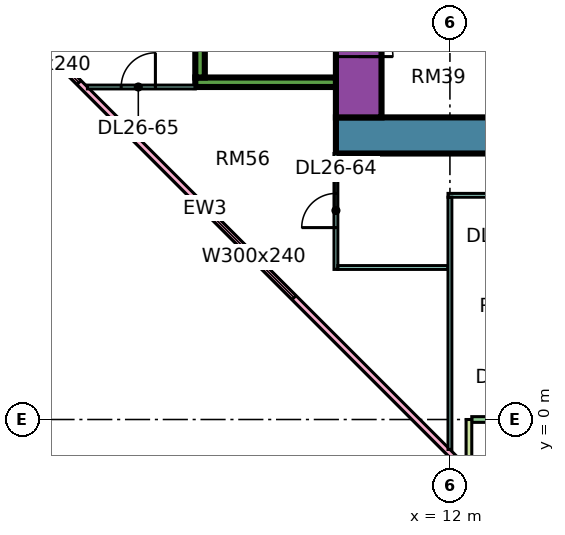
"""IFC4 building model, lengths in metres.
Left out: names, types, materials, properties, quantities, classifications, styles, units other than length and angle.
Written with IfcOpenShell. Run it as: python <this file> out.ifc"""

import sys

from ifc_helpers import new_model, si_unit, direction, frame, frame_2d, origin, place, context, subcontext, project, spatial, rectangle, extrude, element, fill, save


model = new_model("IFC4")
c1 = context("Model", 3, precision=1e-05, world=origin(), true_north=direction((0.0, 1.0)))
c2 = subcontext(c1, "Body", "Model", "MODEL_VIEW")
j1 = project(units=[si_unit("LENGTHUNIT", "METRE"), si_unit("PLANEANGLEUNIT", "RADIAN")], contexts=[c1])
p1 = place(None, origin())
s1 = spatial("IfcSite", under=j1, at=p1, CompositionType="ELEMENT")
p2 = place(p1, origin())
s2 = spatial("IfcBuilding", under=s1, at=p2, CompositionType="ELEMENT")
p3 = place(p2, frame((0.0, 0.0, 114.4)))
s3 = spatial("IfcBuildingStorey", under=s2, at=p3, CompositionType="ELEMENT", Elevation=114.4)
p4 = place(p3, frame((9.0, 7.475, 0.0), z_axis=(0.0, 0.0, 1.0), x_axis=(1.0, 0.0, 0.0)))
e1 = element("IfcWall", 1, at=p4, inside=s3, PredefinedType="SHEAR", context=c2, shape_type="SweptSolid", body=[
    extrude(rectangle(XDim=25.0, YDim=0.95, at=frame_2d((12.5, 0.0))), origin(), (0.0, 0.0, 1.0), 3.75),
])
p5 = place(p3, frame((9.6, 7.95, 0.0), z_axis=(0.0, 0.0, 1.0), x_axis=(0.0, 1.0, 0.0)))
e2 = element("IfcWall", 2, at=p5, inside=s3, PredefinedType="SHEAR", context=c2, shape_type="SweptSolid", body=[
    extrude(rectangle(XDim=11.1, YDim=1.2, at=frame_2d((5.55, 0.0))), origin(), (0.0, 0.0, 1.0), 3.75),
])
p6 = place(p5, frame((3.925, 0.0, 0.0)))
e3 = element("IfcOpeningElement", 3, at=p6, cuts=e2, PredefinedType="OPENING", context=c2, shape_type="SweptSolid", body=[
    extrude(rectangle(XDim=1.1, YDim=2.2, at=frame_2d((0.55, 1.1))), frame((0.0, 0.61, 0.0), z_axis=(0.0, -1.0, 0.0), x_axis=(1.0, 0.0, 0.0)), (0.0, 0.0, 1.0), 1.22),
])
p7 = place(p5, frame((6.425, 0.0, 0.0)))
e4 = element("IfcOpeningElement", 4, at=p7, cuts=e2, PredefinedType="OPENING", context=c2, shape_type="SweptSolid", body=[
    extrude(rectangle(XDim=1.1, YDim=2.2, at=frame_2d((0.55, 1.1))), frame((0.0, 0.61, 0.0), z_axis=(0.0, -1.0, 0.0), x_axis=(1.0, 0.0, 0.0)), (0.0, 0.0, 1.0), 1.22),
])
p8 = place(p5, frame((9.175, 0.0, 0.0)))
e5 = element("IfcOpeningElement", 5, at=p8, cuts=e2, PredefinedType="OPENING", context=c2, shape_type="SweptSolid", body=[
    extrude(rectangle(XDim=1.1, YDim=2.2, at=frame_2d((0.55, 1.1))), frame((0.0, 0.61, 0.0), z_axis=(0.0, -1.0, 0.0), x_axis=(1.0, 0.0, 0.0)), (0.0, 0.0, 1.0), 1.22),
])
p9 = place(p5, frame((1.6, 0.0, 0.0)))
e6 = element("IfcOpeningElement", 6, at=p9, cuts=e2, PredefinedType="OPENING", context=c2, shape_type="SweptSolid", body=[
    extrude(rectangle(XDim=0.9, YDim=2.1, at=frame_2d((0.45, 1.05))), frame((0.0, 0.61, 0.0), z_axis=(0.0, -1.0, 0.0), x_axis=(1.0, 0.0, 0.0)), (0.0, 0.0, 1.0), 1.22),
])
p10 = place(p3, frame((5.3, 8.875, 0.0), z_axis=(0.0, 0.0, 1.0), x_axis=(1.0, 0.0, 0.0)))
e7 = element("IfcWall", 7, at=p10, inside=s3, PredefinedType="SHEAR", context=c2, shape_type="SweptSolid", body=[
    extrude(rectangle(XDim=3.7, YDim=0.25, at=frame_2d((1.85, 0.0))), origin(), (0.0, 0.0, 1.0), 3.75),
])
p11 = place(p3, frame((5.425, 9.0, 0.0), z_axis=(0.0, 0.0, 1.0), x_axis=(0.0, 1.0, 0.0)))
e8 = element("IfcWall", 8, at=p11, inside=s3, PredefinedType="SHEAR", context=c2, shape_type="SweptSolid", body=[
    extrude(rectangle(XDim=4.0, YDim=0.25, at=frame_2d((2.0, 0.0))), origin(), (0.0, 0.0, 1.0), 3.75),
])
p12 = place(p3, frame((-1.447, 12.553, 0.0), z_axis=(0.0, 0.0, 1.0), x_axis=(0.707106781187, -0.707106781187, 0.0)))
e9 = element("IfcWall", 9, at=p12, inside=s3, PredefinedType="SOLIDWALL", context=c2, shape_type="SweptSolid", body=[
    extrude(rectangle(XDim=19.799, YDim=0.15, at=frame_2d((9.899, 0.0))), origin(), (0.0, 0.0, 1.0), 3.35),
])
p13 = place(p12, frame((2.212, 0.0, 0.45)))
e10 = element("IfcOpeningElement", 10, at=p13, cuts=e9, PredefinedType="OPENING", context=c2, shape_type="SweptSolid", body=[
    extrude(rectangle(XDim=3.0, YDim=2.4, at=frame_2d((1.5, 1.2))), frame((0.0, 0.085, 0.0), z_axis=(0.0, -1.0, 0.0), x_axis=(1.0, 0.0, 0.0)), (0.0, 0.0, 1.0), 0.17),
])
p14 = place(p12, frame((10.216, 0.0, 0.45)))
e11 = element("IfcOpeningElement", 11, at=p14, cuts=e9, PredefinedType="OPENING", context=c2, shape_type="SweptSolid", body=[
    extrude(rectangle(XDim=3.0, YDim=2.4, at=frame_2d((1.5, 1.2))), frame((0.0, 0.085, 0.0), z_axis=(0.0, -1.0, 0.0), x_axis=(1.0, 0.0, 0.0)), (0.0, 0.0, 1.0), 0.17),
])
p15 = place(p3, frame((12.575, 0.0, 0.0), z_axis=(0.0, 0.0, 1.0), x_axis=(1.0, 0.0, 0.0)))
e12 = element("IfcWall", 12, at=p15, inside=s3, PredefinedType="SOLIDWALL", context=c2, shape_type="SweptSolid", body=[
    extrude(rectangle(XDim=11.35, YDim=0.15, at=frame_2d((5.675, 0.0))), origin(), (0.0, 0.0, 1.0), 3.35),
])
p16 = place(p15, frame((0.613, 0.0, 0.0)))
e13 = element("IfcOpeningElement", 13, at=p16, cuts=e12, PredefinedType="OPENING", context=c2, shape_type="SweptSolid", body=[
    extrude(rectangle(XDim=1.2, YDim=2.4, at=frame_2d((0.6, 1.2))), frame((0.0, 0.085, 0.0), z_axis=(0.0, -1.0, 0.0), x_axis=(1.0, 0.0, 0.0)), (0.0, 0.0, 1.0), 0.17),
])
p17 = place(p15, frame((3.025, 0.0, 0.45)))
e14 = element("IfcOpeningElement", 14, at=p17, cuts=e12, PredefinedType="OPENING", context=c2, shape_type="SweptSolid", body=[
    extrude(rectangle(XDim=1.8, YDim=2.4, at=frame_2d((0.9, 1.2))), frame((0.0, 0.085, 0.0), z_axis=(0.0, -1.0, 0.0), x_axis=(1.0, 0.0, 0.0)), (0.0, 0.0, 1.0), 0.17),
])
p18 = place(p15, frame((6.025, 0.0, 0.45)))
e15 = element("IfcOpeningElement", 15, at=p18, cuts=e12, PredefinedType="OPENING", context=c2, shape_type="SweptSolid", body=[
    extrude(rectangle(XDim=1.8, YDim=2.4, at=frame_2d((0.9, 1.2))), frame((0.0, 0.085, 0.0), z_axis=(0.0, -1.0, 0.0), x_axis=(1.0, 0.0, 0.0)), (0.0, 0.0, 1.0), 0.17),
])
p19 = place(p15, frame((9.025, 0.0, 0.45)))
e16 = element("IfcOpeningElement", 16, at=p19, cuts=e12, PredefinedType="OPENING", context=c2, shape_type="SweptSolid", body=[
    extrude(rectangle(XDim=1.2, YDim=2.4, at=frame_2d((0.6, 1.2))), frame((0.0, 0.085, 0.0), z_axis=(0.0, -1.0, 0.0), x_axis=(1.0, 0.0, 0.0)), (0.0, 0.0, 1.0), 0.17),
])
p20 = place(p3, frame((12.5, -1.5, 0.0), z_axis=(0.0, 0.0, 1.0), x_axis=(0.0, 1.0, 0.0)))
e17 = element("IfcWall", 17, at=p20, inside=s3, PredefinedType="SOLIDWALL", context=c2, shape_type="SweptSolid", body=[
    extrude(rectangle(XDim=1.5, YDim=0.15, at=frame_2d((0.75, 0.0))), origin(), (0.0, 0.0, 1.0), 3.35),
])
p21 = place(p3, frame((2.461, 8.75, 0.0), z_axis=(0.0, 0.0, 1.0), x_axis=(1.0, 0.0, 0.0)))
e18 = element("IfcWall", 18, at=p21, inside=s3, PredefinedType="PARTITIONING", context=c2, shape_type="SweptSolid", body=[
    extrude(rectangle(XDim=2.839, YDim=0.1, at=frame_2d((1.419, 0.0))), origin(), (0.0, 0.0, 1.0), 3.35),
])
p22 = place(p21, frame((0.889, 0.0, 0.0)))
e19 = element("IfcOpeningElement", 19, at=p22, cuts=e18, PredefinedType="OPENING", context=c2, shape_type="SweptSolid", body=[
    extrude(rectangle(XDim=0.9, YDim=2.1, at=frame_2d((0.45, 1.05))), frame((0.0, 0.06, 0.0), z_axis=(0.0, -1.0, 0.0), x_axis=(1.0, 0.0, 0.0)), (0.0, 0.0, 1.0), 0.12),
])
p23 = place(p3, frame((9.0, 3.95, 0.0), z_axis=(0.0, 0.0, 1.0), x_axis=(0.0, 1.0, 0.0)))
e20 = element("IfcWall", 20, at=p23, inside=s3, PredefinedType="PARTITIONING", context=c2, shape_type="SweptSolid", body=[
    extrude(rectangle(XDim=3.05, YDim=0.1, at=frame_2d((1.525, 0.0))), origin(), (0.0, 0.0, 1.0), 3.35),
])
p24 = place(p23, frame((1.1, 0.0, 0.0)))
e21 = element("IfcOpeningElement", 21, at=p24, cuts=e20, PredefinedType="OPENING", context=c2, shape_type="SweptSolid", body=[
    extrude(rectangle(XDim=0.9, YDim=2.1, at=frame_2d((0.45, 1.05))), frame((0.0, 0.06, 0.0), z_axis=(0.0, -1.0, 0.0), x_axis=(1.0, 0.0, 0.0)), (0.0, 0.0, 1.0), 0.12),
])
p25 = place(p3, frame((9.05, 4.0, 0.0), z_axis=(0.0, 0.0, 1.0), x_axis=(1.0, 0.0, 0.0)))
e22 = element("IfcWall", 22, at=p25, inside=s3, PredefinedType="PARTITIONING", context=c2, shape_type="SweptSolid", body=[
    extrude(rectangle(XDim=2.9, YDim=0.1, at=frame_2d((1.45, 0.0))), origin(), (0.0, 0.0, 1.0), 3.35),
])
p26 = place(p3, frame((11.95, 5.9, 0.0), z_axis=(0.0, 0.0, 1.0), x_axis=(1.0, 0.0, 0.0)))
e23 = element("IfcWall", 23, at=p26, inside=s3, PredefinedType="PARTITIONING", context=c2, shape_type="SweptSolid", body=[
    extrude(rectangle(XDim=21.1, YDim=0.1, at=frame_2d((10.55, 0.0))), origin(), (0.0, 0.0, 1.0), 3.35),
])
p27 = place(p26, frame((1.1, 0.0, 0.0)))
e24 = element("IfcOpeningElement", 24, at=p27, cuts=e23, PredefinedType="OPENING", context=c2, shape_type="SweptSolid", body=[
    extrude(rectangle(XDim=0.9, YDim=2.1, at=frame_2d((0.45, 1.05))), frame((0.0, 0.06, 0.0), z_axis=(0.0, -1.0, 0.0), x_axis=(1.0, 0.0, 0.0)), (0.0, 0.0, 1.0), 0.12),
])
p28 = place(p26, frame((4.1, 0.0, 0.0)))
e25 = element("IfcOpeningElement", 25, at=p28, cuts=e23, PredefinedType="OPENING", context=c2, shape_type="SweptSolid", body=[
    extrude(rectangle(XDim=0.9, YDim=2.1, at=frame_2d((0.45, 1.05))), frame((0.0, 0.06, 0.0), z_axis=(0.0, -1.0, 0.0), x_axis=(1.0, 0.0, 0.0)), (0.0, 0.0, 1.0), 0.12),
])
p29 = place(p26, frame((7.1, 0.0, 0.0)))
e26 = element("IfcOpeningElement", 26, at=p29, cuts=e23, PredefinedType="OPENING", context=c2, shape_type="SweptSolid", body=[
    extrude(rectangle(XDim=0.9, YDim=2.1, at=frame_2d((0.45, 1.05))), frame((0.0, 0.06, 0.0), z_axis=(0.0, -1.0, 0.0), x_axis=(1.0, 0.0, 0.0)), (0.0, 0.0, 1.0), 0.12),
])
p30 = place(p26, frame((10.1, 0.0, 0.0)))
e27 = element("IfcOpeningElement", 27, at=p30, cuts=e23, PredefinedType="OPENING", context=c2, shape_type="SweptSolid", body=[
    extrude(rectangle(XDim=0.9, YDim=2.1, at=frame_2d((0.45, 1.05))), frame((0.0, 0.06, 0.0), z_axis=(0.0, -1.0, 0.0), x_axis=(1.0, 0.0, 0.0)), (0.0, 0.0, 1.0), 0.12),
])
p31 = place(p26, frame((16.1, 0.0, 0.0)))
e28 = element("IfcOpeningElement", 28, at=p31, cuts=e23, PredefinedType="OPENING", context=c2, shape_type="SweptSolid", body=[
    extrude(rectangle(XDim=0.9, YDim=2.1, at=frame_2d((0.45, 1.05))), frame((0.0, 0.06, 0.0), z_axis=(0.0, -1.0, 0.0), x_axis=(1.0, 0.0, 0.0)), (0.0, 0.0, 1.0), 0.12),
])
p32 = place(p3, frame((12.0, -0.788, 0.0), z_axis=(0.0, 0.0, 1.0), x_axis=(0.0, 1.0, 0.0)))
e29 = element("IfcWall", 29, at=p32, inside=s3, PredefinedType="PARTITIONING", context=c2, shape_type="SweptSolid", body=[
    extrude(rectangle(XDim=6.638, YDim=0.1, at=frame_2d((3.319, 0.0))), origin(), (0.0, 0.0, 1.0), 3.35),
])
p33 = place(p13, origin())
e30 = element("IfcWindow", 30, at=p33, inside=s3, PartitioningType="SINGLE_PANEL", PredefinedType="WINDOW", context=c2, shape_type="SweptSolid", body=[
    extrude(rectangle(XDim=3.0, YDim=2.4, at=frame_2d((1.5, 1.2))), frame((0.0, 0.03, 0.0), z_axis=(0.0, -1.0, 0.0), x_axis=(1.0, 0.0, 0.0)), (0.0, 0.0, 1.0), 0.06),
])
fill(e10, e30)
p34 = place(p14, origin())
e31 = element("IfcWindow", 31, at=p34, inside=s3, PartitioningType="SINGLE_PANEL", PredefinedType="WINDOW", context=c2, shape_type="SweptSolid", body=[
    extrude(rectangle(XDim=3.0, YDim=2.4, at=frame_2d((1.5, 1.2))), frame((0.0, 0.03, 0.0), z_axis=(0.0, -1.0, 0.0), x_axis=(1.0, 0.0, 0.0)), (0.0, 0.0, 1.0), 0.06),
])
fill(e11, e31)
p35 = place(p9, frame((0.9, 0.0, 0.0), z_axis=(0.0, 0.0, 1.0), x_axis=(-1.0, 0.0, 0.0)))
e32 = element("IfcDoor", 32, at=p35, inside=s3, OperationType="SINGLE_SWING_LEFT", PredefinedType="DOOR", context=c2, shape_type="SweptSolid", body=[
    extrude(rectangle(XDim=0.9, YDim=2.1, at=frame_2d((0.45, 1.05))), frame((0.0, 0.025, 0.0), z_axis=(0.0, -1.0, 0.0), x_axis=(1.0, 0.0, 0.0)), (0.0, 0.0, 1.0), 0.05),
])
fill(e6, e32)
p36 = place(p24, origin())
e33 = element("IfcDoor", 33, at=p36, inside=s3, OperationType="SINGLE_SWING_LEFT", PredefinedType="DOOR", context=c2, shape_type="SweptSolid", body=[
    extrude(rectangle(XDim=0.9, YDim=2.1, at=frame_2d((0.45, 1.05))), frame((0.0, 0.025, 0.0), z_axis=(0.0, -1.0, 0.0), x_axis=(1.0, 0.0, 0.0)), (0.0, 0.0, 1.0), 0.05),
])
fill(e21, e33)
p37 = place(p22, frame((0.9, 0.0, 0.0), z_axis=(0.0, 0.0, 1.0), x_axis=(-1.0, 0.0, 0.0)))
e34 = element("IfcDoor", 34, at=p37, inside=s3, OperationType="SINGLE_SWING_RIGHT", PredefinedType="DOOR", context=c2, shape_type="SweptSolid", body=[
    extrude(rectangle(XDim=0.9, YDim=2.1, at=frame_2d((0.45, 1.05))), frame((0.0, 0.025, 0.0), z_axis=(0.0, -1.0, 0.0), x_axis=(1.0, 0.0, 0.0)), (0.0, 0.0, 1.0), 0.05),
])
fill(e19, e34)
save(model, sys.argv[1])
